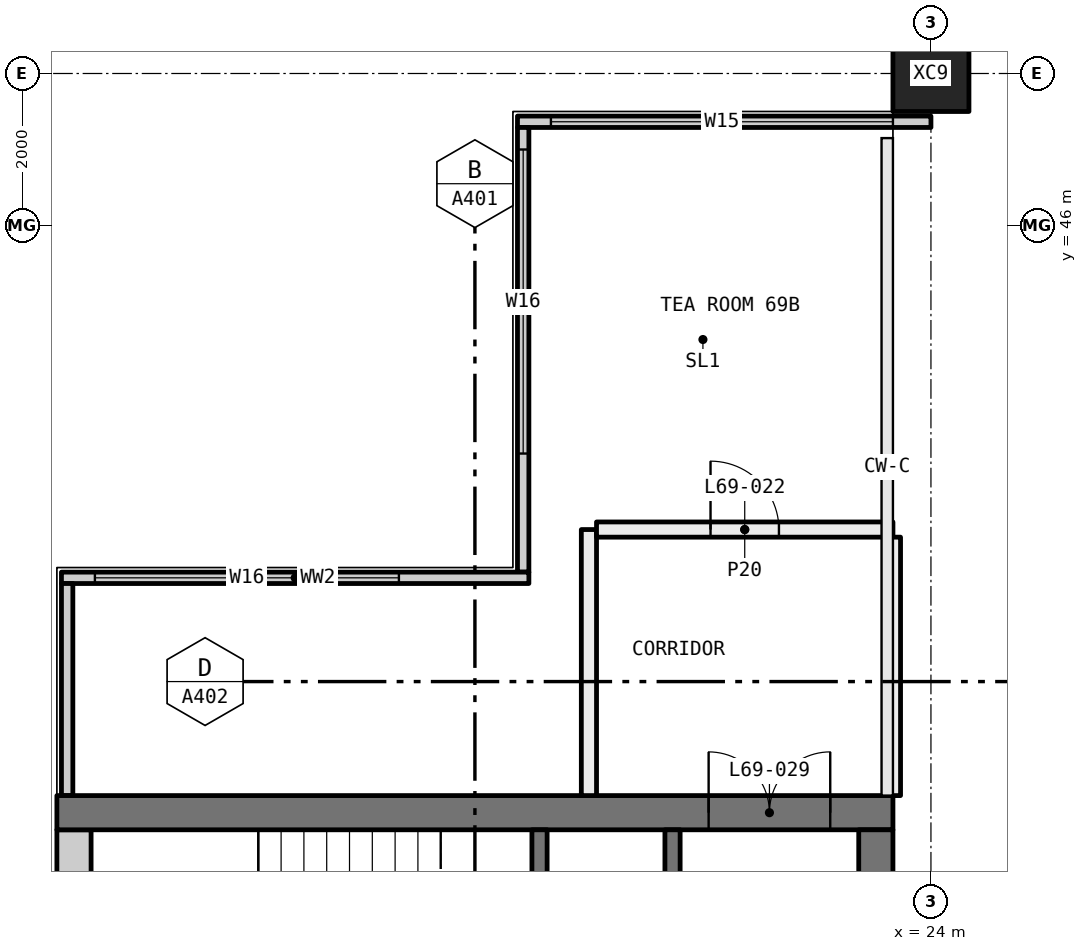
"""IFC4 building model, lengths in metres.
Left out: names, types, materials, properties, quantities, classifications, styles, units other than length and angle.
Written with IfcOpenShell. Run it as: python <this file> out.ifc"""

import sys

from ifc_helpers import new_model, si_unit, direction, frame, frame_2d, origin, origin_2d, place, context, subcontext, project, spatial, rectangle, hollow_rectangle, extrude, element, fill, save


model = new_model("IFC4")
c1 = context("Model", 3, precision=1e-05, world=origin(), true_north=direction((0.0, 1.0)))
c2 = subcontext(c1, "Body", "Model", "MODEL_VIEW")
j1 = project(units=[si_unit("LENGTHUNIT", "METRE"), si_unit("PLANEANGLEUNIT", "RADIAN")], contexts=[c1])
p1 = place(None, origin())
s1 = spatial("IfcSite", under=j1, at=p1, CompositionType="ELEMENT")
p2 = place(p1, origin())
s2 = spatial("IfcBuilding", under=s1, at=p2, CompositionType="ELEMENT")
p3 = place(p2, frame((0.0, 0.0, 255.9)))
s3 = spatial("IfcBuildingStorey", under=s2, at=p3, CompositionType="ELEMENT", Elevation=255.9)
p4 = place(p3, frame((24.0, 48.0, -0.4), z_axis=(0.0, 0.0, 1.0), x_axis=(1.0, 0.0, 0.0)))
e1 = element("IfcColumn", 1, at=p4, inside=s3, PredefinedType="COLUMN", context=c2, shape_type="SweptSolid", body=[
    extrude(hollow_rectangle(XDim=1.0, YDim=1.0, WallThickness=0.036, at=origin_2d()), origin(), (0.0, 0.0, 1.0), 3.45),
])
p5 = place(p3, frame((18.56, 47.365, 0.0), z_axis=(0.0, 0.0, 1.0), x_axis=(1.0, 0.0, 0.0)))
e2 = element("IfcWall", 2, at=p5, inside=s3, PredefinedType="ELEMENTEDWALL", context=c2, shape_type="SweptSolid", body=[
    extrude(rectangle(XDim=5.44, YDim=0.15, at=frame_2d((2.72, 0.0))), origin(), (0.0, 0.0, 1.0), 3.05),
])
p6 = place(p5, frame((0.44, 0.0, 0.45)))
e3 = element("IfcOpeningElement", 3, at=p6, cuts=e2, PredefinedType="OPENING", context=c2, shape_type="SweptSolid", body=[
    extrude(rectangle(XDim=4.5, YDim=2.55, at=frame_2d((2.25, 1.275))), frame((0.0, 0.085, 0.0), z_axis=(0.0, -1.0, 0.0), x_axis=(1.0, 0.0, 0.0)), (0.0, 0.0, 1.0), 0.17),
])
p7 = place(p3, frame((18.635, 41.44, 0.0), z_axis=(0.0, 0.0, 1.0), x_axis=(0.0, 1.0, 0.0)))
e4 = element("IfcWall", 4, at=p7, inside=s3, PredefinedType="ELEMENTEDWALL", context=c2, shape_type="SweptSolid", body=[
    extrude(rectangle(XDim=5.85, YDim=0.15, at=frame_2d((2.925, 0.0))), origin(), (0.0, 0.0, 1.0), 3.05),
])
p8 = place(p7, frame((1.56, 0.0, 0.45)))
e5 = element("IfcOpeningElement", 5, at=p8, cuts=e4, PredefinedType="OPENING", context=c2, shape_type="SweptSolid", body=[
    extrude(rectangle(XDim=4.0, YDim=2.55, at=frame_2d((2.0, 1.275))), frame((0.0, 0.085, 0.0), z_axis=(0.0, -1.0, 0.0), x_axis=(1.0, 0.0, 0.0)), (0.0, 0.0, 1.0), 0.17),
])
p9 = place(p3, frame((12.56, 41.365, 0.0), z_axis=(0.0, 0.0, 1.0), x_axis=(1.0, 0.0, 0.0)))
e6 = element("IfcWall", 6, at=p9, inside=s3, PredefinedType="ELEMENTEDWALL", context=c2, shape_type="SweptSolid", body=[
    extrude(rectangle(XDim=6.15, YDim=0.15, at=frame_2d((3.075, 0.0))), origin(), (0.0, 0.0, 1.0), 3.05),
])
p10 = place(p9, frame((0.44, 0.0, 0.45)))
e7 = element("IfcOpeningElement", 7, at=p10, cuts=e6, PredefinedType="OPENING", context=c2, shape_type="SweptSolid", body=[
    extrude(rectangle(XDim=4.0, YDim=2.55, at=frame_2d((2.0, 1.275))), frame((0.0, 0.085, 0.0), z_axis=(0.0, -1.0, 0.0), x_axis=(1.0, 0.0, 0.0)), (0.0, 0.0, 1.0), 0.17),
])
p11 = place(p3, frame((12.635, 38.5, 0.0), z_axis=(0.0, 0.0, 1.0), x_axis=(0.0, 1.0, 0.0)))
e8 = element("IfcWall", 8, at=p11, inside=s3, PredefinedType="ELEMENTEDWALL", context=c2, shape_type="SweptSolid", body=[
    extrude(rectangle(XDim=2.79, YDim=0.15, at=frame_2d((1.395, 0.0))), origin(), (0.0, 0.0, 1.0), 3.05),
])
p12 = place(p3, frame((19.5, 38.5, 0.0), z_axis=(0.0, 0.0, 1.0), x_axis=(0.0, 1.0, 0.0)))
e9 = element("IfcWall", 9, at=p12, inside=s3, PredefinedType="PARTITIONING", context=c2, shape_type="SweptSolid", body=[
    extrude(rectangle(XDim=3.5, YDim=0.2, at=frame_2d((1.75, 0.0))), origin(), (0.0, 0.0, 1.0), 3.05),
])
p13 = place(p3, frame((19.6, 42.0, 0.0), z_axis=(0.0, 0.0, 1.0), x_axis=(1.0, 0.0, 0.0)))
e10 = element("IfcWall", 10, at=p13, inside=s3, PredefinedType="PARTITIONING", context=c2, shape_type="SweptSolid", body=[
    extrude(rectangle(XDim=3.9, YDim=0.2, at=frame_2d((1.95, 0.0))), origin(), (0.0, 0.0, 1.0), 3.05),
])
p14 = place(p13, frame((1.5, 0.0, 0.0)))
e11 = element("IfcOpeningElement", 11, at=p14, cuts=e10, PredefinedType="OPENING", context=c2, shape_type="SweptSolid", body=[
    extrude(rectangle(XDim=0.9, YDim=2.1, at=frame_2d((0.45, 1.05))), frame((0.0, 0.11, 0.0), z_axis=(0.0, -1.0, 0.0), x_axis=(1.0, 0.0, 0.0)), (0.0, 0.0, 1.0), 0.22),
])
p15 = place(p3, frame((23.5, 41.9, 0.0), z_axis=(0.0, 0.0, 1.0), x_axis=(0.0, -1.0, 0.0)))
e12 = element("IfcWall", 12, at=p15, inside=s3, PredefinedType="PARTITIONING", context=c2, shape_type="SweptSolid", body=[
    extrude(rectangle(XDim=3.4, YDim=0.2, at=frame_2d((1.7, 0.0))), origin(), (0.0, 0.0, 1.0), 3.05),
])
p16 = place(p3, frame((12.5, 38.275, 0.0), z_axis=(0.0, 0.0, 1.0), x_axis=(1.0, 0.0, 0.0)))
e13 = element("IfcWall", 13, at=p16, inside=s3, PredefinedType="SHEAR", context=c2, shape_type="SweptSolid", body=[
    extrude(rectangle(XDim=11.0, YDim=0.45, at=frame_2d((5.5, 0.0))), origin(), (0.0, 0.0, 1.0), 3.05),
])
p17 = place(p16, frame((8.575, 0.0, 0.0)))
e14 = element("IfcOpeningElement", 14, at=p17, cuts=e13, PredefinedType="OPENING", context=c2, shape_type="SweptSolid", body=[
    extrude(rectangle(XDim=1.6, YDim=2.1, at=frame_2d((0.8, 1.05))), frame((0.0, 0.235, 0.0), z_axis=(0.0, -1.0, 0.0), x_axis=(1.0, 0.0, 0.0)), (0.0, 0.0, 1.0), 0.47),
])
for number, where, z_axis, x_axis in (
    (15, (12.725, 21.95, 0.0), (0.0, 0.0, 1.0), (0.0, 1.0, 0.0)),
    (16, (23.275, 21.95, 0.0), (0.0, 0.0, 1.0), (0.0, 1.0, 0.0)),
):
    element("IfcWall", number, at=place(p3, frame(where, z_axis=z_axis, x_axis=x_axis)), inside=s3, PredefinedType="SHEAR", context=c2, shape_type="SweptSolid", body=[
        extrude(rectangle(XDim=16.1, YDim=0.45, at=frame_2d((8.05, 0.0))), origin(), (0.0, 0.0, 1.0), 3.05),
    ])
p18 = place(p3, frame((20.6, 25.1, 0.0), z_axis=(0.0, 0.0, 1.0), x_axis=(0.0, 1.0, 0.0)))
e17 = element("IfcWall", 17, at=p18, inside=s3, PredefinedType="SOLIDWALL", context=c2, shape_type="SweptSolid", body=[
    extrude(rectangle(XDim=12.95, YDim=0.2, at=frame_2d((6.475, 0.0))), origin(), (0.0, 0.0, 1.0), 3.05),
])
p19 = place(p18, frame((0.6, 0.0, 0.0)))
e18 = element("IfcOpeningElement", 18, at=p19, cuts=e17, PredefinedType="OPENING", context=c2, shape_type="SweptSolid", body=[
    extrude(rectangle(XDim=1.1, YDim=2.1, at=frame_2d((0.55, 1.05))), frame((0.0, 0.11, 0.0), z_axis=(0.0, -1.0, 0.0), x_axis=(1.0, 0.0, 0.0)), (0.0, 0.0, 1.0), 0.22),
])
p20 = place(p18, frame((3.1, 0.0, 0.0)))
e19 = element("IfcOpeningElement", 19, at=p20, cuts=e17, PredefinedType="OPENING", context=c2, shape_type="SweptSolid", body=[
    extrude(rectangle(XDim=1.1, YDim=2.1, at=frame_2d((0.55, 1.05))), frame((0.0, 0.11, 0.0), z_axis=(0.0, -1.0, 0.0), x_axis=(1.0, 0.0, 0.0)), (0.0, 0.0, 1.0), 0.22),
])
p21 = place(p18, frame((5.6, 0.0, 0.0)))
e20 = element("IfcOpeningElement", 20, at=p21, cuts=e17, PredefinedType="OPENING", context=c2, shape_type="SweptSolid", body=[
    extrude(rectangle(XDim=1.1, YDim=2.1, at=frame_2d((0.55, 1.05))), frame((0.0, 0.11, 0.0), z_axis=(0.0, -1.0, 0.0), x_axis=(1.0, 0.0, 0.0)), (0.0, 0.0, 1.0), 0.22),
])
p22 = place(p18, frame((8.1, 0.0, 0.0)))
e21 = element("IfcOpeningElement", 21, at=p22, cuts=e17, PredefinedType="OPENING", context=c2, shape_type="SweptSolid", body=[
    extrude(rectangle(XDim=1.1, YDim=2.1, at=frame_2d((0.55, 1.05))), frame((0.0, 0.11, 0.0), z_axis=(0.0, -1.0, 0.0), x_axis=(1.0, 0.0, 0.0)), (0.0, 0.0, 1.0), 0.22),
])
p23 = place(p18, frame((10.975, 0.0, 0.0)))
e22 = element("IfcOpeningElement", 22, at=p23, cuts=e17, PredefinedType="OPENING", context=c2, shape_type="SweptSolid", body=[
    extrude(rectangle(XDim=1.0, YDim=2.1, at=frame_2d((0.5, 1.05))), frame((0.0, 0.11, 0.0), z_axis=(0.0, -1.0, 0.0), x_axis=(1.0, 0.0, 0.0)), (0.0, 0.0, 1.0), 0.22),
])
p24 = place(p3, frame((18.85, 35.1, 0.0), z_axis=(0.0, 0.0, 1.0), x_axis=(0.0, 1.0, 0.0)))
e23 = element("IfcWall", 23, at=p24, inside=s3, PredefinedType="SOLIDWALL", context=c2, shape_type="SweptSolid", body=[
    extrude(rectangle(XDim=2.95, YDim=0.2, at=frame_2d((1.475, 0.0))), origin(), (0.0, 0.0, 1.0), 3.05),
])
p25 = place(p24, frame((0.975, 0.0, 0.0)))
e24 = element("IfcOpeningElement", 24, at=p25, cuts=e23, PredefinedType="OPENING", context=c2, shape_type="SweptSolid", body=[
    extrude(rectangle(XDim=1.0, YDim=2.1, at=frame_2d((0.5, 1.05))), frame((0.0, 0.11, 0.0), z_axis=(0.0, -1.0, 0.0), x_axis=(1.0, 0.0, 0.0)), (0.0, 0.0, 1.0), 0.22),
])
p26 = place(p6, origin())
e25 = element("IfcWindow", 25, at=p26, inside=s3, PartitioningType="SINGLE_PANEL", PredefinedType="WINDOW", context=c2, shape_type="SweptSolid", body=[
    extrude(rectangle(XDim=4.5, YDim=2.55, at=frame_2d((2.25, 1.275))), frame((0.0, 0.03, 0.0), z_axis=(0.0, -1.0, 0.0), x_axis=(1.0, 0.0, 0.0)), (0.0, 0.0, 1.0), 0.06),
])
fill(e3, e25)
p27 = place(p8, origin())
e26 = element("IfcWindow", 26, at=p27, inside=s3, PartitioningType="SINGLE_PANEL", PredefinedType="WINDOW", context=c2, shape_type="SweptSolid", body=[
    extrude(rectangle(XDim=4.0, YDim=2.55, at=frame_2d((2.0, 1.275))), frame((0.0, 0.03, 0.0), z_axis=(0.0, -1.0, 0.0), x_axis=(1.0, 0.0, 0.0)), (0.0, 0.0, 1.0), 0.06),
])
fill(e5, e26)
p28 = place(p10, origin())
e27 = element("IfcWindow", 27, at=p28, inside=s3, PartitioningType="SINGLE_PANEL", PredefinedType="WINDOW", context=c2, shape_type="SweptSolid", body=[
    extrude(rectangle(XDim=4.0, YDim=2.55, at=frame_2d((2.0, 1.275))), frame((0.0, 0.03, 0.0), z_axis=(0.0, -1.0, 0.0), x_axis=(1.0, 0.0, 0.0)), (0.0, 0.0, 1.0), 0.06),
])
fill(e7, e27)
p29 = place(p14, origin())
e28 = element("IfcDoor", 28, at=p29, inside=s3, OperationType="SINGLE_SWING_RIGHT", PredefinedType="DOOR", context=c2, shape_type="SweptSolid", body=[
    extrude(rectangle(XDim=0.9, YDim=2.1, at=frame_2d((0.45, 1.05))), frame((0.0, 0.025, 0.0), z_axis=(0.0, -1.0, 0.0), x_axis=(1.0, 0.0, 0.0)), (0.0, 0.0, 1.0), 0.05),
])
fill(e11, e28)
p30 = place(p17, origin())
e29 = element("IfcDoor", 29, at=p30, inside=s3, OperationType="DOUBLE_DOOR_SINGLE_SWING", PredefinedType="DOOR", context=c2, shape_type="SweptSolid", body=[
    extrude(rectangle(XDim=1.6, YDim=2.1, at=frame_2d((0.8, 1.05))), frame((0.0, 0.025, 0.0), z_axis=(0.0, -1.0, 0.0), x_axis=(1.0, 0.0, 0.0)), (0.0, 0.0, 1.0), 0.05),
])
fill(e14, e29)
save(model, sys.argv[1])
